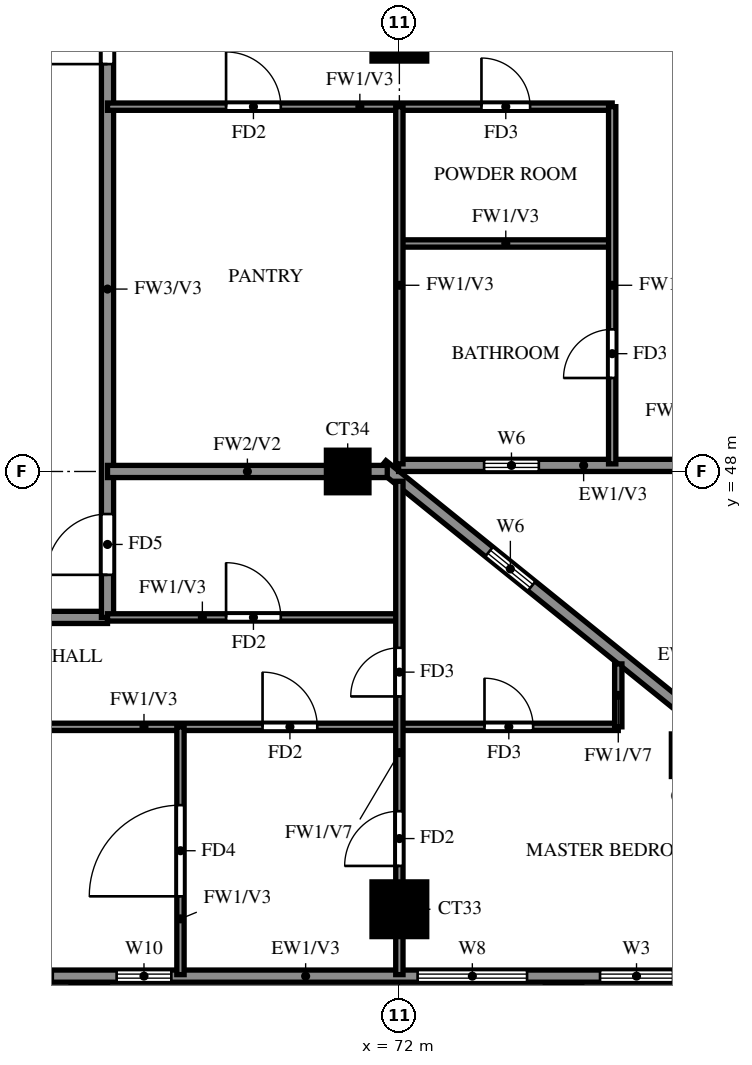
"""IFC4 building model, lengths in metres.
Left out: names, types, materials, properties, quantities, classifications, styles, units other than length and angle.
Written with IfcOpenShell. Run it as: python <this file> out.ifc"""

import sys

from ifc_helpers import new_model, si_unit, direction, frame, frame_2d, origin, origin_2d, place, context, subcontext, project, spatial, rectangle, extrude, source, transform, mapped, element, fill, save


model = new_model("IFC4")
c1 = context("Model", 3, precision=1e-05, world=origin(), true_north=direction((0.0, 1.0)))
c2 = subcontext(c1, "Body", "Model", "MODEL_VIEW")
j1 = project(units=[si_unit("LENGTHUNIT", "METRE"), si_unit("PLANEANGLEUNIT", "RADIAN")], contexts=[c1])
p1 = place(None, origin())
s1 = spatial("IfcSite", under=j1, at=p1, CompositionType="ELEMENT")
p2 = place(p1, origin())
s2 = spatial("IfcBuilding", under=s1, at=p2, CompositionType="ELEMENT")
p3 = place(p2, frame((0.0, 0.0, 225.5)))
s3 = spatial("IfcBuildingStorey", under=s2, at=p3, CompositionType="ELEMENT", Elevation=225.5)
m1 = source(origin(), c2, "Body", "SweptSolid", [
    extrude(rectangle(XDim=0.9, YDim=0.9, at=origin_2d()), origin(), (0.0, 0.0, 1.0), 3.22),
])
p4 = place(p3, frame((72.0, 40.8, 0.0), z_axis=(0.0, 0.0, 1.0), x_axis=(1.0, 0.0, 0.0)))
e1 = element("IfcColumn", 1, at=p4, inside=s3, PredefinedType="COLUMN", context=c2, shape_type="MappedRepresentation", body=[
    mapped(m1, transform((0.0, 0.0, 0.0))),
])
m2 = source(origin(), c2, "Body", "SweptSolid", [
    extrude(rectangle(XDim=0.7, YDim=0.7, at=origin_2d()), origin(), (0.0, 0.0, 1.0), 3.22),
])
for number, where, z_axis, x_axis in (
    (2, (76.823, 43.333, 0.0), (0.0, 0.0, 1.0), (1.0, 0.0, 0.0)),
    (3, (71.15, 48.0, 0.0), (0.0, 0.0, 1.0), (1.0, 0.0, 0.0)),
):
    element("IfcColumn", number, at=place(p3, frame(where, z_axis=z_axis, x_axis=x_axis)), inside=s3, PredefinedType="COLUMN", context=c2, shape_type="MappedRepresentation", body=[
        mapped(m2, transform((0.0, 0.0, 0.0))),
    ])
p5 = place(p3, frame((72.0, 55.2, 0.0), z_axis=(0.0, 0.0, 1.0), x_axis=(1.0, 0.0, 0.0)))
e4 = element("IfcColumn", 4, at=p5, inside=s3, PredefinedType="COLUMN", context=c2, shape_type="MappedRepresentation", body=[
    mapped(m1, transform((0.0, 0.0, 0.0))),
])
p6 = place(p3, frame((81.907, 39.87, 0.0), z_axis=(0.0, 0.0, 1.0), x_axis=(-0.777936274417, 0.62834318087, 0.0)))
e5 = element("IfcWall", 5, at=p6, inside=s3, PredefinedType="SOLIDWALL", context=c2, shape_type="SweptSolid", body=[
    extrude(rectangle(XDim=13.099, YDim=0.2, at=frame_2d((6.549, 0.0))), origin(), (0.0, 0.0, 1.0), 3.22),
])
p7 = place(p6, frame((9.938, 0.0, 1.5)))
e6 = element("IfcOpeningElement", 6, at=p7, cuts=e5, PredefinedType="OPENING", context=c2, shape_type="SweptSolid", body=[
    extrude(rectangle(XDim=0.9, YDim=0.9, at=frame_2d((0.45, 0.45))), frame((0.0, 0.11, 0.0), z_axis=(0.0, -1.0, 0.0), x_axis=(1.0, 0.0, 0.0)), (0.0, 0.0, 1.0), 0.22),
])
p8 = place(p3, frame((71.987, 48.1, 0.0), z_axis=(0.0, 0.0, 1.0), x_axis=(1.0, 0.0, 0.0)))
e7 = element("IfcWall", 7, at=p8, inside=s3, PredefinedType="SOLIDWALL", context=c2, shape_type="SweptSolid", body=[
    extrude(rectangle(XDim=6.763, YDim=0.2, at=frame_2d((3.381, 0.0))), origin(), (0.0, 0.0, 1.0), 3.22),
])
p9 = place(p8, frame((1.406, 0.0, 1.5)))
e8 = element("IfcOpeningElement", 8, at=p9, cuts=e7, PredefinedType="OPENING", context=c2, shape_type="SweptSolid", body=[
    extrude(rectangle(XDim=0.9, YDim=0.9, at=frame_2d((0.45, 0.45))), frame((0.0, 0.11, 0.0), z_axis=(0.0, -1.0, 0.0), x_axis=(1.0, 0.0, 0.0)), (0.0, 0.0, 1.0), 0.22),
])
p10 = place(p3, frame((58.8, 39.7, 0.0), z_axis=(0.0, 0.0, 1.0), x_axis=(1.0, 0.0, 0.0)))
e9 = element("IfcWall", 9, at=p10, inside=s3, PredefinedType="SOLIDWALL", context=c2, shape_type="SweptSolid", body=[
    extrude(rectangle(XDim=23.317, YDim=0.2, at=frame_2d((11.658, 0.0))), origin(), (0.0, 0.0, 1.0), 3.22),
])
p11 = place(p10, frame((3.3, 0.0, 0.0)))
e10 = element("IfcOpeningElement", 10, at=p11, cuts=e9, PredefinedType="OPENING", context=c2, shape_type="SweptSolid", body=[
    extrude(rectangle(XDim=1.8, YDim=2.4, at=frame_2d((0.9, 1.2))), frame((0.0, 0.11, 0.0), z_axis=(0.0, -1.0, 0.0), x_axis=(1.0, 0.0, 0.0)), (0.0, 0.0, 1.0), 0.22),
])
p12 = place(p10, frame((18.3, 0.0, 0.0)))
e11 = element("IfcOpeningElement", 11, at=p12, cuts=e9, PredefinedType="OPENING", context=c2, shape_type="SweptSolid", body=[
    extrude(rectangle(XDim=1.8, YDim=2.4, at=frame_2d((0.9, 1.2))), frame((0.0, 0.11, 0.0), z_axis=(0.0, -1.0, 0.0), x_axis=(1.0, 0.0, 0.0)), (0.0, 0.0, 1.0), 0.22),
])
p13 = place(p10, frame((1.95, 0.0, 0.6)))
e12 = element("IfcOpeningElement", 12, at=p13, cuts=e9, PredefinedType="OPENING", context=c2, shape_type="SweptSolid", body=[
    extrude(rectangle(XDim=0.9, YDim=2.4, at=frame_2d((0.45, 1.2))), frame((0.0, 0.11, 0.0), z_axis=(0.0, -1.0, 0.0), x_axis=(1.0, 0.0, 0.0)), (0.0, 0.0, 1.0), 0.22),
])
p14 = place(p10, frame((5.7, 0.0, 0.6)))
e13 = element("IfcOpeningElement", 13, at=p14, cuts=e9, PredefinedType="OPENING", context=c2, shape_type="SweptSolid", body=[
    extrude(rectangle(XDim=1.8, YDim=2.4, at=frame_2d((0.9, 1.2))), frame((0.0, 0.11, 0.0), z_axis=(0.0, -1.0, 0.0), x_axis=(1.0, 0.0, 0.0)), (0.0, 0.0, 1.0), 0.22),
])
p15 = place(p10, frame((8.55, 0.0, 0.6)))
e14 = element("IfcOpeningElement", 14, at=p15, cuts=e9, PredefinedType="OPENING", context=c2, shape_type="SweptSolid", body=[
    extrude(rectangle(XDim=0.9, YDim=2.4, at=frame_2d((0.45, 1.2))), frame((0.0, 0.11, 0.0), z_axis=(0.0, -1.0, 0.0), x_axis=(1.0, 0.0, 0.0)), (0.0, 0.0, 1.0), 0.22),
])
p16 = place(p10, frame((13.5, 0.0, 0.6)))
e15 = element("IfcOpeningElement", 15, at=p16, cuts=e9, PredefinedType="OPENING", context=c2, shape_type="SweptSolid", body=[
    extrude(rectangle(XDim=1.8, YDim=2.4, at=frame_2d((0.9, 1.2))), frame((0.0, 0.11, 0.0), z_axis=(0.0, -1.0, 0.0), x_axis=(1.0, 0.0, 0.0)), (0.0, 0.0, 1.0), 0.22),
])
p17 = place(p10, frame((16.5, 0.0, 0.6)))
e16 = element("IfcOpeningElement", 16, at=p17, cuts=e9, PredefinedType="OPENING", context=c2, shape_type="SweptSolid", body=[
    extrude(rectangle(XDim=1.2, YDim=2.4, at=frame_2d((0.6, 1.2))), frame((0.0, 0.11, 0.0), z_axis=(0.0, -1.0, 0.0), x_axis=(1.0, 0.0, 0.0)), (0.0, 0.0, 1.0), 0.22),
])
p18 = place(p10, frame((20.7, 0.0, 0.6)))
e17 = element("IfcOpeningElement", 17, at=p18, cuts=e9, PredefinedType="OPENING", context=c2, shape_type="SweptSolid", body=[
    extrude(rectangle(XDim=1.2, YDim=2.4, at=frame_2d((0.6, 1.2))), frame((0.0, 0.11, 0.0), z_axis=(0.0, -1.0, 0.0), x_axis=(1.0, 0.0, 0.0)), (0.0, 0.0, 1.0), 0.22),
])
p19 = place(p3, frame((60.0, 45.6, 0.0), z_axis=(0.0, 0.0, 1.0), x_axis=(1.0, 0.0, 0.0)))
e18 = element("IfcWall", 18, at=p19, inside=s3, PredefinedType="SOLIDWALL", context=c2, shape_type="SweptSolid", body=[
    extrude(rectangle(XDim=7.2, YDim=0.2, at=frame_2d((3.6, 0.0))), origin(), (0.0, 0.0, 1.0), 3.22),
])
p20 = place(p3, frame((67.2, 45.6, 0.0), z_axis=(0.0, 0.0, 1.0), x_axis=(0.0, 1.0, 0.0)))
e19 = element("IfcWall", 19, at=p20, inside=s3, PredefinedType="SOLIDWALL", context=c2, shape_type="SweptSolid", body=[
    extrude(rectangle(XDim=10.8, YDim=0.2, at=frame_2d((5.4, 0.0))), origin(), (0.0, 0.0, 1.0), 3.22),
])
p21 = place(p20, frame((9.1, 0.0, 0.0)))
e20 = element("IfcOpeningElement", 20, at=p21, cuts=e19, PredefinedType="OPENING", context=c2, shape_type="SweptSolid", body=[
    extrude(rectangle(XDim=1.0, YDim=2.1, at=frame_2d((0.5, 1.05))), frame((0.0, 0.11, 0.0), z_axis=(0.0, -1.0, 0.0), x_axis=(1.0, 0.0, 0.0)), (0.0, 0.0, 1.0), 0.22),
])
p22 = place(p20, frame((0.7, 0.0, 0.0)))
e21 = element("IfcOpeningElement", 21, at=p22, cuts=e19, PredefinedType="OPENING", context=c2, shape_type="SweptSolid", body=[
    extrude(rectangle(XDim=1.0, YDim=2.1, at=frame_2d((0.5, 1.05))), frame((0.0, 0.11, 0.0), z_axis=(0.0, -1.0, 0.0), x_axis=(1.0, 0.0, 0.0)), (0.0, 0.0, 1.0), 0.22),
])
p23 = place(p3, frame((67.2, 48.0, 0.0), z_axis=(0.0, 0.0, 1.0), x_axis=(1.0, 0.0, 0.0)))
e22 = element("IfcWall", 22, at=p23, inside=s3, PredefinedType="SOLIDWALL", context=c2, shape_type="SweptSolid", body=[
    extrude(rectangle(XDim=4.601, YDim=0.2, at=frame_2d((2.301, 0.0))), origin(), (0.0, 0.0, 1.0), 3.22),
])
p24 = place(p3, frame((60.0, 43.8, 0.0), z_axis=(0.0, 0.0, 1.0), x_axis=(1.0, 0.0, 0.0)))
e23 = element("IfcWall", 23, at=p24, inside=s3, PredefinedType="PARTITIONING", context=c2, shape_type="SweptSolid", body=[
    extrude(rectangle(XDim=15.6, YDim=0.12, at=frame_2d((7.8, 0.0))), origin(), (0.0, 0.0, 1.0), 3.22),
])
p25 = place(p24, frame((9.75, 0.0, 0.0)))
e24 = element("IfcOpeningElement", 24, at=p25, cuts=e23, PredefinedType="OPENING", context=c2, shape_type="SweptSolid", body=[
    extrude(rectangle(XDim=0.9, YDim=2.1, at=frame_2d((0.45, 1.05))), frame((0.0, 0.07, 0.0), z_axis=(0.0, -1.0, 0.0), x_axis=(1.0, 0.0, 0.0)), (0.0, 0.0, 1.0), 0.14),
])
p26 = place(p24, frame((3.45, 0.0, 0.0)))
e25 = element("IfcOpeningElement", 25, at=p26, cuts=e23, PredefinedType="OPENING", context=c2, shape_type="SweptSolid", body=[
    extrude(rectangle(XDim=1.5, YDim=2.1, at=frame_2d((0.75, 1.05))), frame((0.0, 0.07, 0.0), z_axis=(0.0, -1.0, 0.0), x_axis=(1.0, 0.0, 0.0)), (0.0, 0.0, 1.0), 0.14),
])
p27 = place(p24, frame((13.4, 0.0, 0.0)))
e26 = element("IfcOpeningElement", 26, at=p27, cuts=e23, PredefinedType="OPENING", context=c2, shape_type="SweptSolid", body=[
    extrude(rectangle(XDim=0.8, YDim=2.1, at=frame_2d((0.4, 1.05))), frame((0.0, 0.07, 0.0), z_axis=(0.0, -1.0, 0.0), x_axis=(1.0, 0.0, 0.0)), (0.0, 0.0, 1.0), 0.14),
])
p28 = place(p3, frame((67.2, 45.6, 0.0), z_axis=(0.0, 0.0, 1.0), x_axis=(1.0, 0.0, 0.0)))
e27 = element("IfcWall", 27, at=p28, inside=s3, PredefinedType="PARTITIONING", context=c2, shape_type="SweptSolid", body=[
    extrude(rectangle(XDim=4.8, YDim=0.12, at=frame_2d((2.4, 0.0))), origin(), (0.0, 0.0, 1.0), 3.22),
])
p29 = place(p28, frame((1.95, 0.0, 0.0)))
e28 = element("IfcOpeningElement", 28, at=p29, cuts=e27, PredefinedType="OPENING", context=c2, shape_type="SweptSolid", body=[
    extrude(rectangle(XDim=0.9, YDim=2.1, at=frame_2d((0.45, 1.05))), frame((0.0, 0.07, 0.0), z_axis=(0.0, -1.0, 0.0), x_axis=(1.0, 0.0, 0.0)), (0.0, 0.0, 1.0), 0.14),
])
p30 = place(p3, frame((72.0, 51.75, 0.0), z_axis=(0.0, 0.0, 1.0), x_axis=(1.0, 0.0, 0.0)))
e29 = element("IfcWall", 29, at=p30, inside=s3, PredefinedType="PARTITIONING", context=c2, shape_type="SweptSolid", body=[
    extrude(rectangle(XDim=3.5, YDim=0.12, at=frame_2d((1.75, 0.0))), origin(), (0.0, 0.0, 1.0), 3.22),
])
p31 = place(p3, frame((67.2, 54.0, 0.0), z_axis=(0.0, 0.0, 1.0), x_axis=(1.0, 0.0, 0.0)))
e30 = element("IfcWall", 30, at=p31, inside=s3, PredefinedType="PARTITIONING", context=c2, shape_type="SweptSolid", body=[
    extrude(rectangle(XDim=8.3, YDim=0.12, at=frame_2d((4.15, 0.0))), origin(), (0.0, 0.0, 1.0), 3.22),
])
p32 = place(p31, frame((6.15, 0.0, 0.0)))
e31 = element("IfcOpeningElement", 31, at=p32, cuts=e30, PredefinedType="OPENING", context=c2, shape_type="SweptSolid", body=[
    extrude(rectangle(XDim=0.8, YDim=2.1, at=frame_2d((0.4, 1.05))), frame((0.0, 0.07, 0.0), z_axis=(0.0, -1.0, 0.0), x_axis=(1.0, 0.0, 0.0)), (0.0, 0.0, 1.0), 0.14),
])
p33 = place(p31, frame((1.95, 0.0, 0.0)))
e32 = element("IfcOpeningElement", 32, at=p33, cuts=e30, PredefinedType="OPENING", context=c2, shape_type="SweptSolid", body=[
    extrude(rectangle(XDim=0.9, YDim=2.1, at=frame_2d((0.45, 1.05))), frame((0.0, 0.07, 0.0), z_axis=(0.0, -1.0, 0.0), x_axis=(1.0, 0.0, 0.0)), (0.0, 0.0, 1.0), 0.14),
])
p34 = place(p3, frame((68.4, 39.725, 0.0), z_axis=(0.0, 0.0, 1.0), x_axis=(0.0, 1.0, 0.0)))
e33 = element("IfcWall", 33, at=p34, inside=s3, PredefinedType="PARTITIONING", context=c2, shape_type="SweptSolid", body=[
    extrude(rectangle(XDim=4.075, YDim=0.12, at=frame_2d((2.038, 0.0))), origin(), (0.0, 0.0, 1.0), 3.22),
])
p35 = place(p34, frame((1.288, 0.0, 0.0)))
e34 = element("IfcOpeningElement", 34, at=p35, cuts=e33, PredefinedType="OPENING", context=c2, shape_type="SweptSolid", body=[
    extrude(rectangle(XDim=1.5, YDim=2.1, at=frame_2d((0.75, 1.05))), frame((0.0, 0.07, 0.0), z_axis=(0.0, -1.0, 0.0), x_axis=(1.0, 0.0, 0.0)), (0.0, 0.0, 1.0), 0.14),
])
p36 = place(p3, frame((72.0, 39.725, 0.0), z_axis=(0.0, 0.0, 1.0), x_axis=(0.0, 1.0, 0.0)))
e35 = element("IfcWall", 35, at=p36, inside=s3, PredefinedType="PARTITIONING", context=c2, shape_type="SweptSolid", body=[
    extrude(rectangle(XDim=8.114, YDim=0.12, at=frame_2d((4.057, 0.0))), origin(), (0.0, 0.0, 1.0), 2.32),
])
p37 = place(p36, frame((1.788, 0.0, 0.0)))
e36 = element("IfcOpeningElement", 36, at=p37, cuts=e35, PredefinedType="OPENING", context=c2, shape_type="SweptSolid", body=[
    extrude(rectangle(XDim=0.9, YDim=2.1, at=frame_2d((0.45, 1.05))), frame((0.0, 0.07, 0.0), z_axis=(0.0, -1.0, 0.0), x_axis=(1.0, 0.0, 0.0)), (0.0, 0.0, 1.0), 0.14),
])
p38 = place(p36, frame((4.575, 0.0, 0.0)))
e37 = element("IfcOpeningElement", 37, at=p38, cuts=e35, PredefinedType="OPENING", context=c2, shape_type="SweptSolid", body=[
    extrude(rectangle(XDim=0.8, YDim=2.1, at=frame_2d((0.4, 1.05))), frame((0.0, 0.07, 0.0), z_axis=(0.0, -1.0, 0.0), x_axis=(1.0, 0.0, 0.0)), (0.0, 0.0, 1.0), 0.14),
])
p39 = place(p3, frame((72.0, 48.125, 0.0), z_axis=(0.0, 0.0, 1.0), x_axis=(0.0, 1.0, 0.0)))
e38 = element("IfcWall", 38, at=p39, inside=s3, PredefinedType="PARTITIONING", context=c2, shape_type="SweptSolid", body=[
    extrude(rectangle(XDim=5.875, YDim=0.12, at=frame_2d((2.938, 0.0))), origin(), (0.0, 0.0, 1.0), 3.22),
])
p40 = place(p3, frame((75.5, 48.125, 0.0), z_axis=(0.0, 0.0, 1.0), x_axis=(0.0, 1.0, 0.0)))
e39 = element("IfcWall", 39, at=p40, inside=s3, PredefinedType="PARTITIONING", context=c2, shape_type="SweptSolid", body=[
    extrude(rectangle(XDim=5.875, YDim=0.12, at=frame_2d((2.938, 0.0))), origin(), (0.0, 0.0, 1.0), 3.22),
])
p41 = place(p40, frame((1.413, 0.0, 0.0)))
e40 = element("IfcOpeningElement", 40, at=p41, cuts=e39, PredefinedType="OPENING", context=c2, shape_type="SweptSolid", body=[
    extrude(rectangle(XDim=0.8, YDim=2.1, at=frame_2d((0.4, 1.05))), frame((0.0, 0.07, 0.0), z_axis=(0.0, -1.0, 0.0), x_axis=(1.0, 0.0, 0.0)), (0.0, 0.0, 1.0), 0.14),
])
p42 = place(p3, frame((75.6, 43.8, 0.0), z_axis=(0.0, 0.0, 1.0), x_axis=(0.0, 1.0, 0.0)))
e41 = element("IfcWall", 41, at=p42, inside=s3, PredefinedType="PARTITIONING", context=c2, shape_type="SweptSolid", body=[
    extrude(rectangle(XDim=1.035, YDim=0.12, at=frame_2d((0.518, 0.0))), origin(), (0.0, 0.0, 1.0), 2.32),
])
p43 = place(p7, origin())
e42 = element("IfcWindow", 42, at=p43, inside=s3, PartitioningType="SINGLE_PANEL", PredefinedType="WINDOW", context=c2, shape_type="SweptSolid", body=[
    extrude(rectangle(XDim=0.9, YDim=0.9, at=frame_2d((0.45, 0.45))), frame((0.0, 0.03, 0.0), z_axis=(0.0, -1.0, 0.0), x_axis=(1.0, 0.0, 0.0)), (0.0, 0.0, 1.0), 0.06),
])
fill(e6, e42)
p44 = place(p9, origin())
e43 = element("IfcWindow", 43, at=p44, inside=s3, PartitioningType="SINGLE_PANEL", PredefinedType="WINDOW", context=c2, shape_type="SweptSolid", body=[
    extrude(rectangle(XDim=0.9, YDim=0.9, at=frame_2d((0.45, 0.45))), frame((0.0, 0.03, 0.0), z_axis=(0.0, -1.0, 0.0), x_axis=(1.0, 0.0, 0.0)), (0.0, 0.0, 1.0), 0.06),
])
fill(e8, e43)
p45 = place(p15, origin())
e44 = element("IfcWindow", 44, at=p45, inside=s3, PartitioningType="SINGLE_PANEL", PredefinedType="WINDOW", context=c2, shape_type="SweptSolid", body=[
    extrude(rectangle(XDim=0.9, YDim=2.4, at=frame_2d((0.45, 1.2))), frame((0.0, 0.03, 0.0), z_axis=(0.0, -1.0, 0.0), x_axis=(1.0, 0.0, 0.0)), (0.0, 0.0, 1.0), 0.06),
])
fill(e14, e44)
p46 = place(p16, origin())
e45 = element("IfcWindow", 45, at=p46, inside=s3, PartitioningType="DOUBLE_PANEL_VERTICAL", PredefinedType="WINDOW", context=c2, shape_type="SweptSolid", body=[
    extrude(rectangle(XDim=1.8, YDim=2.4, at=frame_2d((0.9, 1.2))), frame((0.0, 0.03, 0.0), z_axis=(0.0, -1.0, 0.0), x_axis=(1.0, 0.0, 0.0)), (0.0, 0.0, 1.0), 0.06),
])
fill(e15, e45)
p47 = place(p17, origin())
e46 = element("IfcWindow", 46, at=p47, inside=s3, PartitioningType="SINGLE_PANEL", PredefinedType="WINDOW", context=c2, shape_type="SweptSolid", body=[
    extrude(rectangle(XDim=1.2, YDim=2.4, at=frame_2d((0.6, 1.2))), frame((0.0, 0.03, 0.0), z_axis=(0.0, -1.0, 0.0), x_axis=(1.0, 0.0, 0.0)), (0.0, 0.0, 1.0), 0.06),
])
fill(e16, e46)
p48 = place(p21, origin())
e47 = element("IfcDoor", 47, at=p48, inside=s3, OperationType="SINGLE_SWING_RIGHT", PredefinedType="DOOR", context=c2, shape_type="SweptSolid", body=[
    extrude(rectangle(XDim=1.0, YDim=2.1, at=frame_2d((0.5, 1.05))), frame((0.0, 0.025, 0.0), z_axis=(0.0, -1.0, 0.0), x_axis=(1.0, 0.0, 0.0)), (0.0, 0.0, 1.0), 0.05),
])
fill(e20, e47)
p49 = place(p41, origin())
e48 = element("IfcDoor", 48, at=p49, inside=s3, OperationType="SINGLE_SWING_LEFT", PredefinedType="DOOR", context=c2, shape_type="SweptSolid", body=[
    extrude(rectangle(XDim=0.8, YDim=2.1, at=frame_2d((0.4, 1.05))), frame((0.0, 0.025, 0.0), z_axis=(0.0, -1.0, 0.0), x_axis=(1.0, 0.0, 0.0)), (0.0, 0.0, 1.0), 0.05),
])
fill(e40, e48)
p50 = place(p32, origin())
e49 = element("IfcDoor", 49, at=p50, inside=s3, OperationType="SINGLE_SWING_LEFT", PredefinedType="DOOR", context=c2, shape_type="SweptSolid", body=[
    extrude(rectangle(XDim=0.8, YDim=2.1, at=frame_2d((0.4, 1.05))), frame((0.0, 0.025, 0.0), z_axis=(0.0, -1.0, 0.0), x_axis=(1.0, 0.0, 0.0)), (0.0, 0.0, 1.0), 0.05),
])
fill(e31, e49)
p51 = place(p33, origin())
e50 = element("IfcDoor", 50, at=p51, inside=s3, OperationType="SINGLE_SWING_LEFT", PredefinedType="DOOR", context=c2, shape_type="SweptSolid", body=[
    extrude(rectangle(XDim=0.9, YDim=2.1, at=frame_2d((0.45, 1.05))), frame((0.0, 0.025, 0.0), z_axis=(0.0, -1.0, 0.0), x_axis=(1.0, 0.0, 0.0)), (0.0, 0.0, 1.0), 0.05),
])
fill(e32, e50)
p52 = place(p35, origin())
e51 = element("IfcDoor", 51, at=p52, inside=s3, OperationType="SINGLE_SWING_RIGHT", PredefinedType="DOOR", context=c2, shape_type="SweptSolid", body=[
    extrude(rectangle(XDim=1.5, YDim=2.1, at=frame_2d((0.75, 1.05))), frame((0.0, 0.025, 0.0), z_axis=(0.0, -1.0, 0.0), x_axis=(1.0, 0.0, 0.0)), (0.0, 0.0, 1.0), 0.05),
])
fill(e34, e51)
p53 = place(p29, origin())
e52 = element("IfcDoor", 52, at=p53, inside=s3, OperationType="SINGLE_SWING_LEFT", PredefinedType="DOOR", context=c2, shape_type="SweptSolid", body=[
    extrude(rectangle(XDim=0.9, YDim=2.1, at=frame_2d((0.45, 1.05))), frame((0.0, 0.025, 0.0), z_axis=(0.0, -1.0, 0.0), x_axis=(1.0, 0.0, 0.0)), (0.0, 0.0, 1.0), 0.05),
])
fill(e28, e52)
p54 = place(p22, origin())
e53 = element("IfcDoor", 53, at=p54, inside=s3, OperationType="SINGLE_SWING_LEFT", PredefinedType="DOOR", context=c2, shape_type="SweptSolid", body=[
    extrude(rectangle(XDim=1.0, YDim=2.1, at=frame_2d((0.5, 1.05))), frame((0.0, 0.025, 0.0), z_axis=(0.0, -1.0, 0.0), x_axis=(1.0, 0.0, 0.0)), (0.0, 0.0, 1.0), 0.05),
])
fill(e21, e53)
p55 = place(p25, origin())
e54 = element("IfcDoor", 54, at=p55, inside=s3, OperationType="SINGLE_SWING_RIGHT", PredefinedType="DOOR", context=c2, shape_type="SweptSolid", body=[
    extrude(rectangle(XDim=0.9, YDim=2.1, at=frame_2d((0.45, 1.05))), frame((0.0, 0.025, 0.0), z_axis=(0.0, -1.0, 0.0), x_axis=(1.0, 0.0, 0.0)), (0.0, 0.0, 1.0), 0.05),
])
fill(e24, e54)
p56 = place(p37, origin())
e55 = element("IfcDoor", 55, at=p56, inside=s3, OperationType="SINGLE_SWING_RIGHT", PredefinedType="DOOR", context=c2, shape_type="SweptSolid", body=[
    extrude(rectangle(XDim=0.9, YDim=2.1, at=frame_2d((0.45, 1.05))), frame((0.0, 0.025, 0.0), z_axis=(0.0, -1.0, 0.0), x_axis=(1.0, 0.0, 0.0)), (0.0, 0.0, 1.0), 0.05),
])
fill(e36, e55)
p57 = place(p38, origin())
e56 = element("IfcDoor", 56, at=p57, inside=s3, OperationType="SINGLE_SWING_RIGHT", PredefinedType="DOOR", context=c2, shape_type="SweptSolid", body=[
    extrude(rectangle(XDim=0.8, YDim=2.1, at=frame_2d((0.4, 1.05))), frame((0.0, 0.025, 0.0), z_axis=(0.0, -1.0, 0.0), x_axis=(1.0, 0.0, 0.0)), (0.0, 0.0, 1.0), 0.05),
])
fill(e37, e56)
p58 = place(p27, origin())
e57 = element("IfcDoor", 57, at=p58, inside=s3, OperationType="SINGLE_SWING_LEFT", PredefinedType="DOOR", context=c2, shape_type="SweptSolid", body=[
    extrude(rectangle(XDim=0.8, YDim=2.1, at=frame_2d((0.4, 1.05))), frame((0.0, 0.025, 0.0), z_axis=(0.0, -1.0, 0.0), x_axis=(1.0, 0.0, 0.0)), (0.0, 0.0, 1.0), 0.05),
])
fill(e26, e57)
save(model, sys.argv[1])
